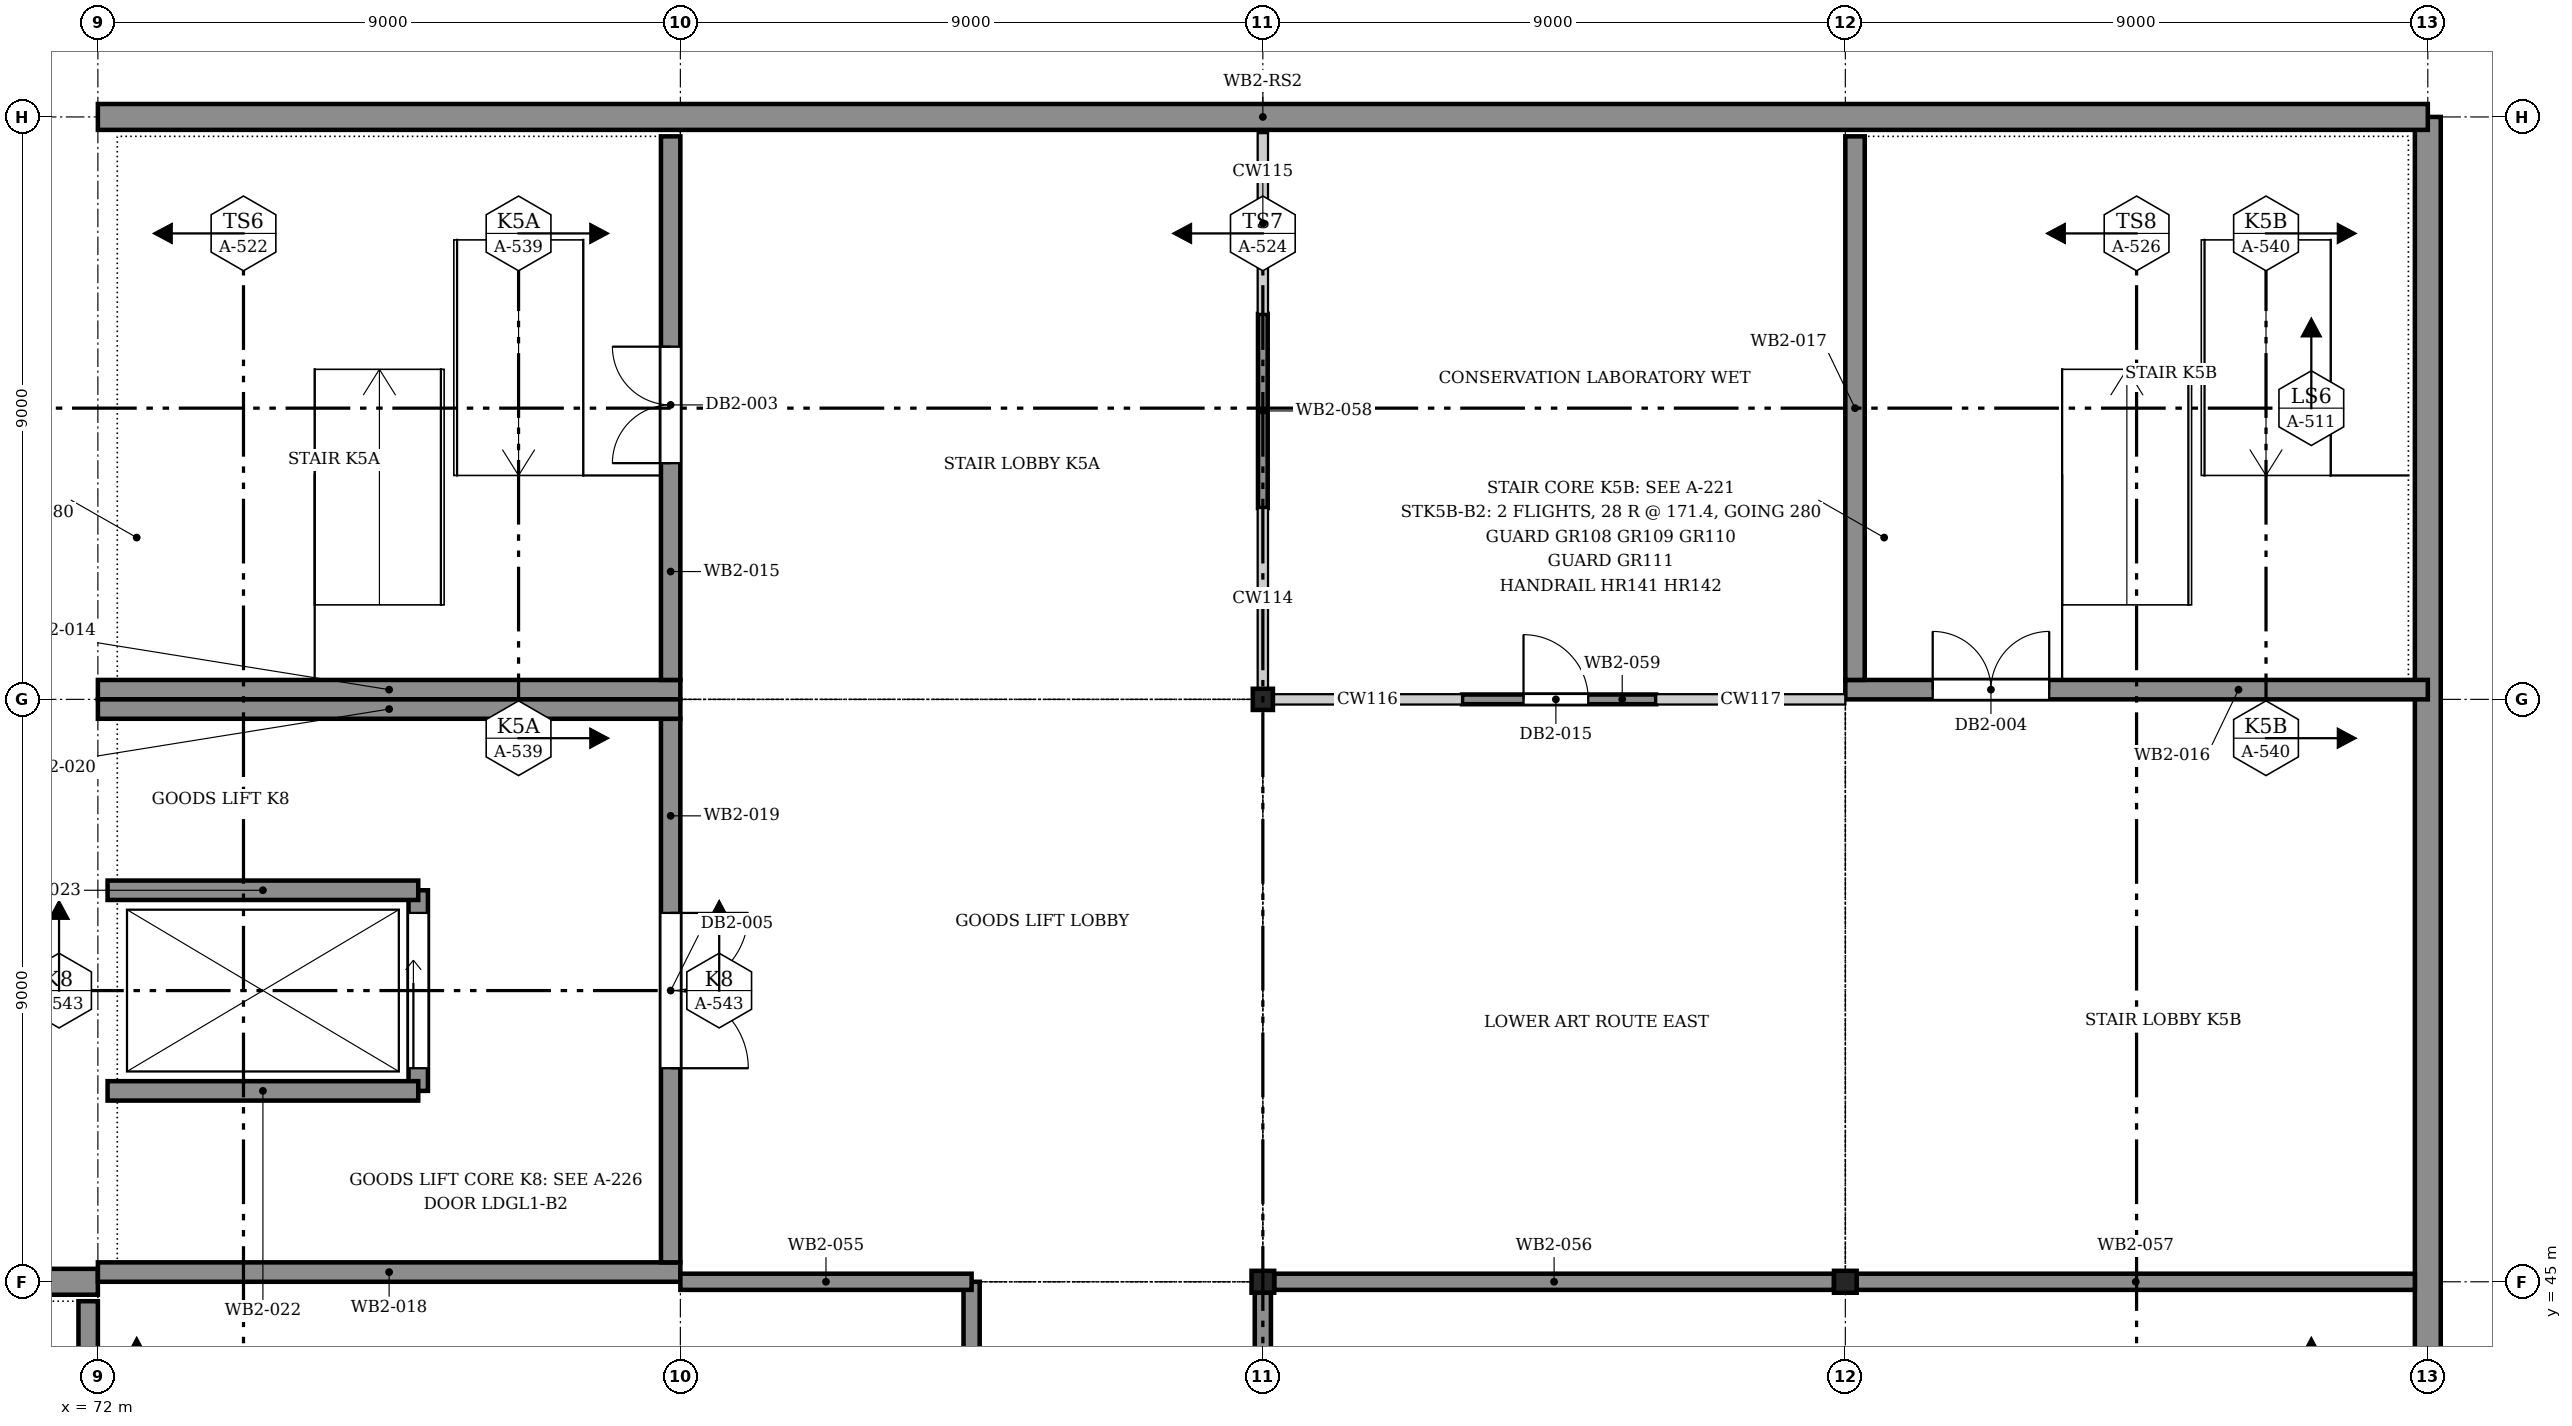
"""IFC4 building model, lengths in metres.
Left out: names, types, materials, properties, quantities, classifications, styles, units other than length and angle.
Written with IfcOpenShell. Run it as: python <this file> out.ifc"""

import sys

from ifc_helpers import new_model, si_unit, direction, frame, frame_2d, origin, origin_2d, place, context, subcontext, project, spatial, rectangle, i_section, extrude, element, fill, save


model = new_model("IFC4")
c1 = context("Model", 3, precision=1e-05, world=origin(), true_north=direction((0.0, 1.0)))
c2 = subcontext(c1, "Body", "Model", "MODEL_VIEW")
j1 = project(units=[si_unit("LENGTHUNIT", "METRE"), si_unit("PLANEANGLEUNIT", "RADIAN")], contexts=[c1])
p1 = place(None, origin())
s1 = spatial("IfcSite", under=j1, at=p1, CompositionType="ELEMENT")
p2 = place(p1, origin())
s2 = spatial("IfcBuilding", under=s1, at=p2, CompositionType="ELEMENT")
p3 = place(p2, frame((0.0, 0.0, -9.6)))
s3 = spatial("IfcBuildingStorey", under=s2, at=p3, CompositionType="ELEMENT", Elevation=-9.6)
for number, where, z_axis, x_axis in (
    (1, (108.0, 18.0, 0.0), (0.0, 0.0, 1.0), (0.0, 1.0, 0.0)),
    (2, (27.0, 45.0, 0.0), (0.0, 0.0, 1.0), (1.0, 0.0, 0.0)),
):
    element("IfcWall", number, at=place(p3, frame(where, z_axis=z_axis, x_axis=x_axis)), inside=s3, PredefinedType="SOLIDWALL", context=c2, shape_type="SweptSolid", body=[
        extrude(rectangle(XDim=45.0, YDim=0.4, at=frame_2d((22.5, 0.0))), origin(), (0.0, 0.0, 1.0), 4.8),
    ])
p4 = place(p3, frame((72.0, 63.0, 0.0), z_axis=(0.0, 0.0, 1.0), x_axis=(1.0, 0.0, 0.0)))
e3 = element("IfcWall", 3, at=p4, inside=s3, PredefinedType="SOLIDWALL", context=c2, shape_type="SweptSolid", body=[
    extrude(rectangle(XDim=36.0, YDim=0.4, at=frame_2d((18.0, 0.0))), origin(), (0.0, 0.0, 1.0), 4.8),
])
p5 = place(p3, frame((72.0, 45.0, 0.0), z_axis=(0.0, 0.0, 1.0), x_axis=(0.0, 1.0, 0.0)))
e4 = element("IfcWall", 4, at=p5, inside=s3, PredefinedType="SOLIDWALL", context=c2, shape_type="SweptSolid", body=[
    extrude(rectangle(XDim=18.0, YDim=0.4, at=frame_2d((9.0, 0.0))), origin(), (0.0, 0.0, 1.0), 4.8),
])
for number, where, z_axis, x_axis in (
    (5, (90.0, 45.0, -0.6), (0.0, 0.0, 1.0), (1.0, 0.0, 0.0)),
    (6, (99.0, 45.0, -0.6), (0.0, 0.0, 1.0), (1.0, 0.0, 0.0)),
):
    element("IfcColumn", number, at=place(p3, frame(where, z_axis=z_axis, x_axis=x_axis)), inside=s3, PredefinedType="COLUMN", context=c2, shape_type="SweptSolid", body=[
        extrude(i_section(OverallWidth=0.35, OverallDepth=0.339, WebThickness=0.025, FlangeThickness=0.032, at=origin_2d()), origin(), (0.0, 0.0, 1.0), 5.4),
    ])
p6 = place(p3, frame((90.0, 54.0, -0.6), z_axis=(0.0, 0.0, 1.0), x_axis=(1.0, 0.0, 0.0)))
e7 = element("IfcColumn", 7, at=p6, inside=s3, PredefinedType="COLUMN", context=c2, shape_type="SweptSolid", body=[
    extrude(i_section(OverallWidth=0.311, OverallDepth=0.327, WebThickness=0.016, FlangeThickness=0.025, FilletRadius=0.017, at=origin_2d()), origin(), (0.0, 0.0, 1.0), 5.4),
])
p7 = place(p3, frame((71.85, 40.8, 0.0), z_axis=(0.0, 0.0, 1.0), x_axis=(0.0, 1.0, 0.0)))
e8 = element("IfcWall", 8, at=p7, inside=s3, PredefinedType="SOLIDWALL", context=c2, shape_type="SweptSolid", body=[
    extrude(rectangle(XDim=3.9, YDim=0.3, at=frame_2d((1.95, 0.0))), origin(), (0.0, 0.0, 1.0), 4.8),
])
p8 = place(p3, frame((72.0, 54.15, 0.0), z_axis=(0.0, 0.0, 1.0), x_axis=(1.0, 0.0, 0.0)))
e9 = element("IfcWall", 9, at=p8, inside=s3, PredefinedType="SOLIDWALL", context=c2, shape_type="SweptSolid", body=[
    extrude(rectangle(XDim=9.0, YDim=0.3, at=frame_2d((4.5, 0.0))), origin(), (0.0, 0.0, 1.0), 4.8),
])
p9 = place(p3, frame((80.85, 54.3, 0.0), z_axis=(0.0, 0.0, 1.0), x_axis=(0.0, 1.0, 0.0)))
e10 = element("IfcWall", 10, at=p9, inside=s3, PredefinedType="SOLIDWALL", context=c2, shape_type="SweptSolid", body=[
    extrude(rectangle(XDim=8.4, YDim=0.3, at=frame_2d((4.2, 0.0))), origin(), (0.0, 0.0, 1.0), 4.8),
])
p10 = place(p9, frame((3.35, 0.0, 0.0)))
e11 = element("IfcOpeningElement", 11, at=p10, cuts=e10, PredefinedType="OPENING", context=c2, shape_type="SweptSolid", body=[
    extrude(rectangle(XDim=1.8, YDim=2.1, at=frame_2d((0.9, 1.05))), frame((0.0, 0.16, 0.0), z_axis=(0.0, -1.0, 0.0), x_axis=(1.0, 0.0, 0.0)), (0.0, 0.0, 1.0), 0.32),
])
p11 = place(p3, frame((99.0, 54.15, 0.0), z_axis=(0.0, 0.0, 1.0), x_axis=(1.0, 0.0, 0.0)))
e12 = element("IfcWall", 12, at=p11, inside=s3, PredefinedType="SOLIDWALL", context=c2, shape_type="SweptSolid", body=[
    extrude(rectangle(XDim=9.0, YDim=0.3, at=frame_2d((4.5, 0.0))), origin(), (0.0, 0.0, 1.0), 4.8),
])
p12 = place(p11, frame((1.35, 0.0, 0.0)))
e13 = element("IfcOpeningElement", 13, at=p12, cuts=e12, PredefinedType="OPENING", context=c2, shape_type="SweptSolid", body=[
    extrude(rectangle(XDim=1.8, YDim=2.1, at=frame_2d((0.9, 1.05))), frame((0.0, 0.16, 0.0), z_axis=(0.0, -1.0, 0.0), x_axis=(1.0, 0.0, 0.0)), (0.0, 0.0, 1.0), 0.32),
])
p13 = place(p3, frame((99.15, 54.3, 0.0), z_axis=(0.0, 0.0, 1.0), x_axis=(0.0, 1.0, 0.0)))
e14 = element("IfcWall", 14, at=p13, inside=s3, PredefinedType="SOLIDWALL", context=c2, shape_type="SweptSolid", body=[
    extrude(rectangle(XDim=8.4, YDim=0.3, at=frame_2d((4.2, 0.0))), origin(), (0.0, 0.0, 1.0), 4.8),
])
p14 = place(p3, frame((72.0, 45.15, -1.5), z_axis=(0.0, 0.0, 1.0), x_axis=(1.0, 0.0, 0.0)))
e15 = element("IfcWall", 15, at=p14, inside=s3, PredefinedType="SOLIDWALL", context=c2, shape_type="SweptSolid", body=[
    extrude(rectangle(XDim=9.0, YDim=0.3, at=frame_2d((4.5, 0.0))), origin(), (0.0, 0.0, 1.0), 6.3),
])
p15 = place(p3, frame((80.85, 45.3, -1.5), z_axis=(0.0, 0.0, 1.0), x_axis=(0.0, 1.0, 0.0)))
e16 = element("IfcWall", 16, at=p15, inside=s3, PredefinedType="SOLIDWALL", context=c2, shape_type="SweptSolid", body=[
    extrude(rectangle(XDim=8.4, YDim=0.3, at=frame_2d((4.2, 0.0))), origin(), (0.0, 0.0, 1.0), 6.3),
])
p16 = place(p15, frame((3.0, 0.0, 1.5)))
e17 = element("IfcOpeningElement", 17, at=p16, cuts=e16, PredefinedType="OPENING", context=c2, shape_type="SweptSolid", body=[
    extrude(rectangle(XDim=2.4, YDim=2.4, at=frame_2d((1.2, 1.2))), frame((0.0, 0.16, 0.0), z_axis=(0.0, -1.0, 0.0), x_axis=(1.0, 0.0, 0.0)), (0.0, 0.0, 1.0), 0.32),
])
p17 = place(p3, frame((72.0, 53.85, -1.5), z_axis=(0.0, 0.0, 1.0), x_axis=(1.0, 0.0, 0.0)))
e18 = element("IfcWall", 18, at=p17, inside=s3, PredefinedType="SOLIDWALL", context=c2, shape_type="SweptSolid", body=[
    extrude(rectangle(XDim=9.0, YDim=0.3, at=frame_2d((4.5, 0.0))), origin(), (0.0, 0.0, 1.0), 6.3),
])
p18 = place(p3, frame((76.95, 47.95, -1.5), z_axis=(0.0, 0.0, 1.0), x_axis=(0.0, 1.0, 0.0)))
e19 = element("IfcWall", 19, at=p18, inside=s3, PredefinedType="SOLIDWALL", context=c2, shape_type="SweptSolid", body=[
    extrude(rectangle(XDim=3.1, YDim=0.3, at=frame_2d((1.55, 0.0))), origin(), (0.0, 0.0, 1.0), 6.3),
])
p19 = place(p18, frame((0.35, 0.0, 1.5)))
e20 = element("IfcOpeningElement", 20, at=p19, cuts=e19, PredefinedType="OPENING", context=c2, shape_type="SweptSolid", body=[
    extrude(rectangle(XDim=2.4, YDim=2.4, at=frame_2d((1.2, 1.2))), frame((0.0, 0.16, 0.0), z_axis=(0.0, -1.0, 0.0), x_axis=(1.0, 0.0, 0.0)), (0.0, 0.0, 1.0), 0.32),
])
for number, where, z_axis, x_axis in (
    (21, (72.15, 47.95, -1.5), (0.0, 0.0, 1.0), (1.0, 0.0, 0.0)),
    (22, (72.15, 51.05, -1.5), (0.0, 0.0, 1.0), (1.0, 0.0, 0.0)),
):
    element("IfcWall", number, at=place(p3, frame(where, z_axis=z_axis, x_axis=x_axis)), inside=s3, PredefinedType="SOLIDWALL", context=c2, shape_type="SweptSolid", body=[
        extrude(rectangle(XDim=4.8, YDim=0.3, at=frame_2d((2.4, 0.0))), origin(), (0.0, 0.0, 1.0), 6.3),
    ])
p20 = place(p3, frame((85.5, 36.0, 0.0), z_axis=(0.0, 0.0, 1.0), x_axis=(0.0, 1.0, 0.0)))
e23 = element("IfcWall", 23, at=p20, inside=s3, PredefinedType="PARTITIONING", context=c2, shape_type="SweptSolid", body=[
    extrude(rectangle(XDim=9.0, YDim=0.25, at=frame_2d((4.5, 0.0))), origin(), (0.0, 0.0, 1.0), 3.758),
])
p21 = place(p20, frame((4.035, 0.0, 0.0)))
e24 = element("IfcOpeningElement", 24, at=p21, cuts=e23, PredefinedType="OPENING", context=c2, shape_type="SweptSolid", body=[
    extrude(rectangle(XDim=1.0, YDim=2.1, at=frame_2d((0.5, 1.05))), frame((0.0, 0.135, 0.0), z_axis=(0.0, -1.0, 0.0), x_axis=(1.0, 0.0, 0.0)), (0.0, 0.0, 1.0), 0.27),
])
p22 = place(p3, frame((90.0, 36.207, 0.0), z_axis=(0.0, 0.0, 1.0), x_axis=(0.0, 1.0, 0.0)))
e25 = element("IfcWall", 25, at=p22, inside=s3, PredefinedType="PARTITIONING", context=c2, shape_type="SweptSolid", body=[
    extrude(rectangle(XDim=8.624, YDim=0.25, at=frame_2d((4.312, 0.0))), origin(), (0.0, 0.0, 1.0), 3.758),
])
p23 = place(p22, frame((3.85, 0.0, 0.0)))
e26 = element("IfcOpeningElement", 26, at=p23, cuts=e25, PredefinedType="OPENING", context=c2, shape_type="SweptSolid", body=[
    extrude(rectangle(XDim=1.0, YDim=2.1, at=frame_2d((0.5, 1.05))), frame((0.0, 0.135, 0.0), z_axis=(0.0, -1.0, 0.0), x_axis=(1.0, 0.0, 0.0)), (0.0, 0.0, 1.0), 0.27),
])
p24 = place(p3, frame((81.0, 45.0, 0.0), z_axis=(0.0, 0.0, 1.0), x_axis=(1.0, 0.0, 0.0)))
e27 = element("IfcWall", 27, at=p24, inside=s3, PredefinedType="PARTITIONING", context=c2, shape_type="SweptSolid", body=[
    extrude(rectangle(XDim=4.5, YDim=0.25, at=frame_2d((2.25, 0.0))), origin(), (0.0, 0.0, 1.0), 3.758),
])
p25 = place(p3, frame((90.175, 45.0, 0.0), z_axis=(0.0, 0.0, 1.0), x_axis=(1.0, 0.0, 0.0)))
e28 = element("IfcWall", 28, at=p25, inside=s3, PredefinedType="PARTITIONING", context=c2, shape_type="SweptSolid", body=[
    extrude(rectangle(XDim=8.65, YDim=0.25, at=frame_2d((4.325, 0.0))), origin(), (0.0, 0.0, 1.0), 3.758),
])
p26 = place(p3, frame((99.175, 45.0, 0.0), z_axis=(0.0, 0.0, 1.0), x_axis=(1.0, 0.0, 0.0)))
e29 = element("IfcWall", 29, at=p26, inside=s3, PredefinedType="PARTITIONING", context=c2, shape_type="SweptSolid", body=[
    extrude(rectangle(XDim=8.625, YDim=0.25, at=frame_2d((4.312, 0.0))), origin(), (0.0, 0.0, 1.0), 3.758),
])
p27 = place(p3, frame((90.0, 56.957, 0.0), z_axis=(0.0, 0.0, 1.0), x_axis=(0.0, 1.0, 0.0)))
e30 = element("IfcWall", 30, at=p27, inside=s3, PredefinedType="PARTITIONING", context=c2, shape_type="SweptSolid", body=[
    extrude(rectangle(XDim=3.0, YDim=0.15, at=frame_2d((1.5, 0.0))), origin(), (0.0, 0.0, 1.0), 3.758),
])
p28 = place(p3, frame((93.078, 54.0, 0.0), z_axis=(0.0, 0.0, 1.0), x_axis=(1.0, 0.0, 0.0)))
e31 = element("IfcWall", 31, at=p28, inside=s3, PredefinedType="PARTITIONING", context=c2, shape_type="SweptSolid", body=[
    extrude(rectangle(XDim=3.0, YDim=0.15, at=frame_2d((1.5, 0.0))), origin(), (0.0, 0.0, 1.0), 3.758),
])
p29 = place(p28, frame((0.95, 0.0, 0.0)))
e32 = element("IfcOpeningElement", 32, at=p29, cuts=e31, PredefinedType="OPENING", context=c2, shape_type="SweptSolid", body=[
    extrude(rectangle(XDim=1.0, YDim=2.1, at=frame_2d((0.5, 1.05))), frame((0.0, 0.085, 0.0), z_axis=(0.0, -1.0, 0.0), x_axis=(1.0, 0.0, 0.0)), (0.0, 0.0, 1.0), 0.17),
])
p30 = place(p10, origin())
e33 = element("IfcDoor", 33, at=p30, inside=s3, OperationType="DOUBLE_DOOR_SINGLE_SWING", PredefinedType="DOOR", context=c2, shape_type="SweptSolid", body=[
    extrude(rectangle(XDim=1.8, YDim=2.1, at=frame_2d((0.9, 1.05))), frame((0.0, 0.025, 0.0), z_axis=(0.0, -1.0, 0.0), x_axis=(1.0, 0.0, 0.0)), (0.0, 0.0, 1.0), 0.05),
])
fill(e11, e33)
p31 = place(p12, origin())
e34 = element("IfcDoor", 34, at=p31, inside=s3, OperationType="DOUBLE_DOOR_SINGLE_SWING", PredefinedType="DOOR", context=c2, shape_type="SweptSolid", body=[
    extrude(rectangle(XDim=1.8, YDim=2.1, at=frame_2d((0.9, 1.05))), frame((0.0, 0.025, 0.0), z_axis=(0.0, -1.0, 0.0), x_axis=(1.0, 0.0, 0.0)), (0.0, 0.0, 1.0), 0.05),
])
fill(e13, e34)
p32 = place(p19, origin())
e35 = element("IfcDoor", 35, at=p32, inside=s3, OperationType="DOUBLE_DOOR_SLIDING", PredefinedType="DOOR", context=c2, shape_type="SweptSolid", body=[
    extrude(rectangle(XDim=2.4, YDim=2.4, at=frame_2d((1.2, 1.2))), frame((0.0, 0.025, 0.0), z_axis=(0.0, -1.0, 0.0), x_axis=(1.0, 0.0, 0.0)), (0.0, 0.0, 1.0), 0.05),
])
fill(e20, e35)
p33 = place(p16, frame((2.4, 0.0, 0.0), z_axis=(0.0, 0.0, 1.0), x_axis=(-1.0, 0.0, 0.0)))
e36 = element("IfcDoor", 36, at=p33, inside=s3, OperationType="DOUBLE_DOOR_SINGLE_SWING", PredefinedType="DOOR", context=c2, shape_type="SweptSolid", body=[
    extrude(rectangle(XDim=2.4, YDim=2.4, at=frame_2d((1.2, 1.2))), frame((0.0, 0.025, 0.0), z_axis=(0.0, -1.0, 0.0), x_axis=(1.0, 0.0, 0.0)), (0.0, 0.0, 1.0), 0.05),
])
fill(e17, e36)
p34 = place(p29, origin())
e37 = element("IfcDoor", 37, at=p34, inside=s3, OperationType="SINGLE_SWING_RIGHT", PredefinedType="DOOR", context=c2, shape_type="SweptSolid", body=[
    extrude(rectangle(XDim=1.0, YDim=2.1, at=frame_2d((0.5, 1.05))), frame((0.0, 0.025, 0.0), z_axis=(0.0, -1.0, 0.0), x_axis=(1.0, 0.0, 0.0)), (0.0, 0.0, 1.0), 0.05),
])
fill(e32, e37)
save(model, sys.argv[1])
